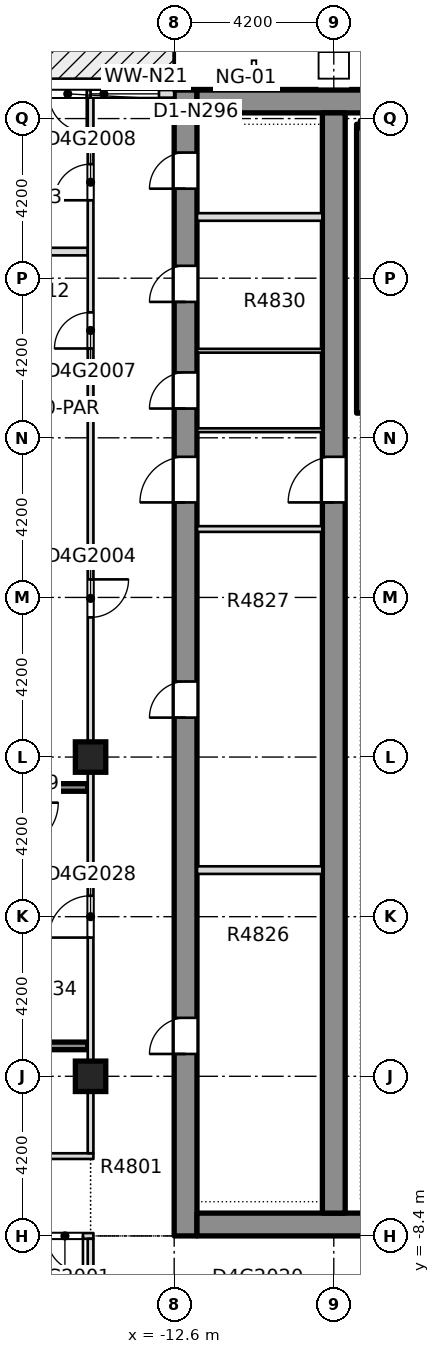
"""IFC4 building model, lengths in metres.
Left out: names, types, materials, properties, quantities, classifications, styles, units other than length and angle.
Written with IfcOpenShell. Run it as: python <this file> out.ifc"""

import sys

from ifc_helpers import new_model, si_unit, direction, frame, frame_2d, origin, origin_2d, place, context, subcontext, project, spatial, rectangle, extrude, element, fill, save


model = new_model("IFC4")
c1 = context("Model", 3, precision=1e-05, world=origin(), true_north=direction((0.0, 1.0)))
c2 = subcontext(c1, "Body", "Model", "MODEL_VIEW")
j1 = project(units=[si_unit("LENGTHUNIT", "METRE"), si_unit("PLANEANGLEUNIT", "RADIAN")], contexts=[c1])
p1 = place(None, origin())
s1 = spatial("IfcSite", under=j1, at=p1, CompositionType="ELEMENT")
p2 = place(p1, origin())
s2 = spatial("IfcBuilding", under=s1, at=p2, CompositionType="ELEMENT")
p3 = place(p2, frame((0.0, 0.0, 185.9)))
s3 = spatial("IfcBuildingStorey", under=s2, at=p3, CompositionType="ELEMENT", Elevation=185.9)
p4 = place(p3, frame((-12.3, -8.4, -0.4), z_axis=(0.0, 0.0, 1.0), x_axis=(0.0, 1.0, 0.0)))
e1 = element("IfcWall", 1, at=p4, inside=s3, PredefinedType="SHEAR", context=c2, shape_type="SweptSolid", body=[
    extrude(rectangle(XDim=30.15, YDim=0.6, at=frame_2d((15.075, 0.0))), origin(), (0.0, 0.0, 1.0), 3.45),
])
p5 = place(p4, frame((4.788, 0.0, 0.4)))
e2 = element("IfcOpeningElement", 2, at=p5, cuts=e1, PredefinedType="OPENING", context=c2, shape_type="SweptSolid", body=[
    extrude(rectangle(XDim=0.95, YDim=2.1, at=frame_2d((0.475, 1.05))), frame((0.0, 0.31, 0.0), z_axis=(0.0, -1.0, 0.0), x_axis=(1.0, 0.0, 0.0)), (0.0, 0.0, 1.0), 0.62),
])
p6 = place(p4, frame((13.638, 0.0, 0.4)))
e3 = element("IfcOpeningElement", 3, at=p6, cuts=e1, PredefinedType="OPENING", context=c2, shape_type="SweptSolid", body=[
    extrude(rectangle(XDim=0.95, YDim=2.1, at=frame_2d((0.475, 1.05))), frame((0.0, 0.31, 0.0), z_axis=(0.0, -1.0, 0.0), x_axis=(1.0, 0.0, 0.0)), (0.0, 0.0, 1.0), 0.62),
])
p7 = place(p4, frame((21.771, 0.0, 0.4)))
e4 = element("IfcOpeningElement", 4, at=p7, cuts=e1, PredefinedType="OPENING", context=c2, shape_type="SweptSolid", body=[
    extrude(rectangle(XDim=0.95, YDim=2.1, at=frame_2d((0.475, 1.05))), frame((0.0, 0.31, 0.0), z_axis=(0.0, -1.0, 0.0), x_axis=(1.0, 0.0, 0.0)), (0.0, 0.0, 1.0), 0.62),
])
p8 = place(p4, frame((24.576, 0.0, 0.4)))
e5 = element("IfcOpeningElement", 5, at=p8, cuts=e1, PredefinedType="OPENING", context=c2, shape_type="SweptSolid", body=[
    extrude(rectangle(XDim=0.95, YDim=2.1, at=frame_2d((0.475, 1.05))), frame((0.0, 0.31, 0.0), z_axis=(0.0, -1.0, 0.0), x_axis=(1.0, 0.0, 0.0)), (0.0, 0.0, 1.0), 0.62),
])
p9 = place(p4, frame((27.555, 0.0, 0.4)))
e6 = element("IfcOpeningElement", 6, at=p9, cuts=e1, PredefinedType="OPENING", context=c2, shape_type="SweptSolid", body=[
    extrude(rectangle(XDim=0.95, YDim=2.1, at=frame_2d((0.475, 1.05))), frame((0.0, 0.31, 0.0), z_axis=(0.0, -1.0, 0.0), x_axis=(1.0, 0.0, 0.0)), (0.0, 0.0, 1.0), 0.62),
])
p10 = place(p4, frame((19.3, 0.0, 0.4)))
e7 = element("IfcOpeningElement", 7, at=p10, cuts=e1, PredefinedType="OPENING", context=c2, shape_type="SweptSolid", body=[
    extrude(rectangle(XDim=1.2, YDim=2.1, at=frame_2d((0.6, 1.05))), frame((0.0, 0.31, 0.0), z_axis=(0.0, -1.0, 0.0), x_axis=(1.0, 0.0, 0.0)), (0.0, 0.0, 1.0), 0.62),
])
p11 = place(p3, frame((-12.0, -8.1, -0.4), z_axis=(0.0, 0.0, 1.0), x_axis=(1.0, 0.0, 0.0)))
e8 = element("IfcWall", 8, at=p11, inside=s3, PredefinedType="SHEAR", context=c2, shape_type="SweptSolid", body=[
    extrude(rectangle(XDim=24.0, YDim=0.6, at=frame_2d((12.0, 0.0))), origin(), (0.0, 0.0, 1.0), 3.45),
])
p12 = place(p11, frame((7.25, 0.0, 0.4)))
e9 = element("IfcOpeningElement", 9, at=p12, cuts=e8, PredefinedType="OPENING", context=c2, shape_type="SweptSolid", body=[
    extrude(rectangle(XDim=1.8, YDim=2.1, at=frame_2d((0.9, 1.05))), frame((0.0, 0.31, 0.0), z_axis=(0.0, -1.0, 0.0), x_axis=(1.0, 0.0, 0.0)), (0.0, 0.0, 1.0), 0.62),
])
p13 = place(p11, frame((14.95, 0.0, 0.4)))
e10 = element("IfcOpeningElement", 10, at=p13, cuts=e8, PredefinedType="OPENING", context=c2, shape_type="SweptSolid", body=[
    extrude(rectangle(XDim=1.8, YDim=2.1, at=frame_2d((0.9, 1.05))), frame((0.0, 0.31, 0.0), z_axis=(0.0, -1.0, 0.0), x_axis=(1.0, 0.0, 0.0)), (0.0, 0.0, 1.0), 0.62),
])
p14 = place(p3, frame((-12.0, 21.45, -0.4), z_axis=(0.0, 0.0, 1.0), x_axis=(1.0, 0.0, 0.0)))
e11 = element("IfcWall", 11, at=p14, inside=s3, PredefinedType="SHEAR", context=c2, shape_type="SweptSolid", body=[
    extrude(rectangle(XDim=24.0, YDim=0.6, at=frame_2d((12.0, 0.0))), origin(), (0.0, 0.0, 1.0), 3.45),
])
p15 = place(p3, frame((-8.4, -7.8, -0.4), z_axis=(0.0, 0.0, 1.0), x_axis=(0.0, 1.0, 0.0)))
e12 = element("IfcWall", 12, at=p15, inside=s3, PredefinedType="SHEAR", context=c2, shape_type="SweptSolid", body=[
    extrude(rectangle(XDim=28.95, YDim=0.6, at=frame_2d((14.475, 0.0))), origin(), (0.0, 0.0, 1.0), 3.45),
])
p16 = place(p15, frame((18.7, 0.0, 0.4)))
e13 = element("IfcOpeningElement", 13, at=p16, cuts=e12, PredefinedType="OPENING", context=c2, shape_type="SweptSolid", body=[
    extrude(rectangle(XDim=1.2, YDim=2.1, at=frame_2d((0.6, 1.05))), frame((0.0, 0.31, 0.0), z_axis=(0.0, -1.0, 0.0), x_axis=(1.0, 0.0, 0.0)), (0.0, 0.0, 1.0), 0.62),
])
for number, where, z_axis, x_axis in (
    (14, (-14.8, -4.2, -0.4), (0.0, 0.0, 1.0), (1.0, 0.0, 0.0)),
    (15, (-14.8, 4.2, -0.4), (0.0, 0.0, 1.0), (1.0, 0.0, 0.0)),
):
    element("IfcColumn", number, at=place(p3, frame(where, z_axis=z_axis, x_axis=x_axis)), inside=s3, PredefinedType="COLUMN", context=c2, shape_type="SweptSolid", body=[
        extrude(rectangle(XDim=0.8, YDim=0.8, at=origin_2d()), origin(), (0.0, 0.0, 1.0), 3.45),
    ])
p17 = place(p3, frame((-25.75, -8.4, 0.0), z_axis=(0.0, 0.0, 1.0), x_axis=(1.0, 0.0, 0.0)))
e16 = element("IfcWall", 16, at=p17, inside=s3, PredefinedType="PARTITIONING", context=c2, shape_type="SweptSolid", body=[
    extrude(rectangle(XDim=11.025, YDim=0.15, at=frame_2d((5.512, 0.0))), origin(), (0.0, 0.0, 1.0), 3.05),
])
p18 = place(p17, frame((9.8, 0.0, 0.0)))
e17 = element("IfcOpeningElement", 17, at=p18, cuts=e16, PredefinedType="OPENING", context=c2, shape_type="SweptSolid", body=[
    extrude(rectangle(XDim=0.95, YDim=2.1, at=frame_2d((0.475, 1.05))), frame((0.0, 0.085, 0.0), z_axis=(0.0, -1.0, 0.0), x_axis=(1.0, 0.0, 0.0)), (0.0, 0.0, 1.0), 0.17),
])
p19 = place(p3, frame((-25.75, -6.3, 0.0), z_axis=(0.0, 0.0, 1.0), x_axis=(1.0, 0.0, 0.0)))
e18 = element("IfcWall", 18, at=p19, inside=s3, PredefinedType="PARTITIONING", context=c2, shape_type="SweptSolid", body=[
    extrude(rectangle(XDim=11.025, YDim=0.15, at=frame_2d((5.512, 0.0))), origin(), (0.0, 0.0, 1.0), 3.05),
])
p20 = place(p19, frame((4.875, 0.0, 0.0)))
e19 = element("IfcOpeningElement", 19, at=p20, cuts=e18, PredefinedType="OPENING", context=c2, shape_type="SweptSolid", body=[
    extrude(rectangle(XDim=1.0, YDim=2.1, at=frame_2d((0.5, 1.05))), frame((0.0, 0.085, 0.0), z_axis=(0.0, -1.0, 0.0), x_axis=(1.0, 0.0, 0.0)), (0.0, 0.0, 1.0), 0.17),
])
p21 = place(p3, frame((-23.0, -3.4, 0.0), z_axis=(0.0, 0.0, 1.0), x_axis=(1.0, 0.0, 0.0)))
e20 = element("IfcWall", 20, at=p21, inside=s3, PredefinedType="SOLIDWALL", context=c2, shape_type="SweptSolid", body=[
    extrude(rectangle(XDim=8.125, YDim=0.2, at=frame_2d((4.062, 0.0))), origin(), (0.0, 0.0, 1.0), 3.05),
])
p22 = place(p3, frame((-20.45, 3.4, 0.0), z_axis=(0.0, 0.0, 1.0), x_axis=(1.0, 0.0, 0.0)))
e21 = element("IfcWall", 21, at=p22, inside=s3, PredefinedType="SOLIDWALL", context=c2, shape_type="SweptSolid", body=[
    extrude(rectangle(XDim=5.575, YDim=0.2, at=frame_2d((2.788, 0.0))), origin(), (0.0, 0.0, 1.0), 3.05),
])
for number, where, z_axis, x_axis in (
    (22, (-17.35, 13.35, 0.0), (0.0, 0.0, 1.0), (1.0, 0.0, 0.0)),
    (23, (-17.35, 17.5, 0.0), (0.0, 0.0, 1.0), (1.0, 0.0, 0.0)),
):
    element("IfcWall", number, at=place(p3, frame(where, z_axis=z_axis, x_axis=x_axis)), inside=s3, PredefinedType="PARTITIONING", context=c2, shape_type="SweptSolid", body=[
        extrude(rectangle(XDim=2.475, YDim=0.2, at=frame_2d((1.238, 0.0))), origin(), (0.0, 0.0, 1.0), 3.05),
    ])
p23 = place(p3, frame((-14.8, -10.6, 0.0), z_axis=(0.0, 0.0, 1.0), x_axis=(0.0, 1.0, 0.0)))
e24 = element("IfcWall", 24, at=p23, inside=s3, PredefinedType="PARTITIONING", context=c2, shape_type="SweptSolid", body=[
    extrude(rectangle(XDim=2.125, YDim=0.15, at=frame_2d((1.062, 0.0))), origin(), (0.0, 0.0, 1.0), 3.05),
])
p24 = place(p3, frame((-14.8, -6.225, 0.0), z_axis=(0.0, 0.0, 1.0), x_axis=(0.0, 1.0, 0.0)))
e25 = element("IfcWall", 25, at=p24, inside=s3, PredefinedType="PARTITIONING", context=c2, shape_type="SweptSolid", body=[
    extrude(rectangle(XDim=27.775, YDim=0.15, at=frame_2d((13.888, 0.0))), origin(), (0.0, 0.0, 1.0), 3.05),
])
p25 = place(p24, frame((14.1, 0.0, 0.0)))
e26 = element("IfcOpeningElement", 26, at=p25, cuts=e25, PredefinedType="OPENING", context=c2, shape_type="SweptSolid", body=[
    extrude(rectangle(XDim=1.0, YDim=2.1, at=frame_2d((0.5, 1.05))), frame((0.0, 0.085, 0.0), z_axis=(0.0, -1.0, 0.0), x_axis=(1.0, 0.0, 0.0)), (0.0, 0.0, 1.0), 0.17),
])
p26 = place(p24, frame((21.175, 0.0, 0.0)))
e27 = element("IfcOpeningElement", 27, at=p26, cuts=e25, PredefinedType="OPENING", context=c2, shape_type="SweptSolid", body=[
    extrude(rectangle(XDim=0.95, YDim=2.1, at=frame_2d((0.475, 1.05))), frame((0.0, 0.085, 0.0), z_axis=(0.0, -1.0, 0.0), x_axis=(1.0, 0.0, 0.0)), (0.0, 0.0, 1.0), 0.17),
])
p27 = place(p24, frame((25.075, 0.0, 0.0)))
e28 = element("IfcOpeningElement", 28, at=p27, cuts=e25, PredefinedType="OPENING", context=c2, shape_type="SweptSolid", body=[
    extrude(rectangle(XDim=0.95, YDim=2.1, at=frame_2d((0.475, 1.05))), frame((0.0, 0.085, 0.0), z_axis=(0.0, -1.0, 0.0), x_axis=(1.0, 0.0, 0.0)), (0.0, 0.0, 1.0), 0.17),
])
p28 = place(p24, frame((5.675, 0.0, 0.0)))
e29 = element("IfcOpeningElement", 29, at=p28, cuts=e25, PredefinedType="OPENING", context=c2, shape_type="SweptSolid", body=[
    extrude(rectangle(XDim=1.1, YDim=2.1, at=frame_2d((0.55, 1.05))), frame((0.0, 0.085, 0.0), z_axis=(0.0, -1.0, 0.0), x_axis=(1.0, 0.0, 0.0)), (0.0, 0.0, 1.0), 0.17),
])
p29 = place(p3, frame((-12.6, 21.65, 0.0), z_axis=(0.0, 0.0, 1.0), x_axis=(-1.0, 0.0, 0.0)))
e30 = element("IfcWall", 30, at=p29, inside=s3, PredefinedType="STANDARD", context=c2, shape_type="SweptSolid", body=[
    extrude(rectangle(XDim=3.7, YDim=0.2, at=frame_2d((1.85, 0.0))), origin(), (0.0, 0.0, 1.0), 3.05),
])
p30 = place(p29, frame((0.4, 0.0, 0.2)))
e31 = element("IfcOpeningElement", 31, at=p30, cuts=e30, PredefinedType="OPENING", context=c2, shape_type="SweptSolid", body=[
    extrude(rectangle(XDim=1.8, YDim=2.65, at=frame_2d((0.9, 1.325))), frame((0.0, 0.11, 0.0), z_axis=(0.0, -1.0, 0.0), x_axis=(1.0, 0.0, 0.0)), (0.0, 0.0, 1.0), 0.22),
])
p31 = place(p29, frame((2.3, 0.0, 0.0)))
e32 = element("IfcOpeningElement", 32, at=p31, cuts=e30, PredefinedType="OPENING", context=c2, shape_type="SweptSolid", body=[
    extrude(rectangle(XDim=1.0, YDim=2.4, at=frame_2d((0.5, 1.2))), frame((0.0, 0.11, 0.0), z_axis=(0.0, -1.0, 0.0), x_axis=(1.0, 0.0, 0.0)), (0.0, 0.0, 1.0), 0.22),
])
p32 = place(p3, frame((-11.999, 1.225, 0.0), z_axis=(0.0, 0.0, 1.0), x_axis=(1.0, 0.0, 0.0)))
e33 = element("IfcWall", 33, at=p32, inside=s3, PredefinedType="PARTITIONING", context=c2, shape_type="SweptSolid", body=[
    extrude(rectangle(XDim=3.298, YDim=0.2, at=frame_2d((1.649, 0.0))), origin(), (0.0, 0.0, 1.0), 3.05),
])
p33 = place(p3, frame((-11.999, 10.2, 0.0), z_axis=(0.0, 0.0, 1.0), x_axis=(1.0, 0.0, 0.0)))
e34 = element("IfcWall", 34, at=p33, inside=s3, PredefinedType="PARTITIONING", context=c2, shape_type="SweptSolid", body=[
    extrude(rectangle(XDim=3.298, YDim=0.15, at=frame_2d((1.649, 0.0))), origin(), (0.0, 0.0, 1.0), 3.05),
])
for number, where, z_axis, x_axis in (
    (35, (-11.999, 12.8, 0.0), (0.0, 0.0, 1.0), (1.0, 0.0, 0.0)),
    (36, (-11.999, 14.891, 0.0), (0.0, 0.0, 1.0), (1.0, 0.0, 0.0)),
):
    element("IfcWall", number, at=place(p3, frame(where, z_axis=z_axis, x_axis=x_axis)), inside=s3, PredefinedType="PARTITIONING", context=c2, shape_type="SweptSolid", body=[
        extrude(rectangle(XDim=3.298, YDim=0.1, at=frame_2d((1.649, 0.0))), origin(), (0.0, 0.0, 1.0), 3.05),
    ])
p34 = place(p3, frame((-11.999, 18.411, 0.0), z_axis=(0.0, 0.0, 1.0), x_axis=(1.0, 0.0, 0.0)))
e37 = element("IfcWall", 37, at=p34, inside=s3, PredefinedType="PARTITIONING", context=c2, shape_type="SweptSolid", body=[
    extrude(rectangle(XDim=3.298, YDim=0.2, at=frame_2d((1.649, 0.0))), origin(), (0.0, 0.0, 1.0), 3.05),
])
p35 = place(p3, frame((-7.7, 13.25, 0.0), z_axis=(0.0, 0.0, 1.0), x_axis=(0.0, 1.0, 0.0)))
e38 = element("IfcWall", 38, at=p35, inside=s3, PredefinedType="SOLIDWALL", context=c2, shape_type="SweptSolid", body=[
    extrude(rectangle(XDim=7.6, YDim=0.2, at=frame_2d((3.8, 0.0))), origin(), (0.0, 0.0, 1.0), 3.05),
])
p36 = place(p3, frame((-7.7, 20.85, 0.0), z_axis=(0.0, 0.0, 1.0), x_axis=(1.0, 0.0, 0.0)))
e39 = element("IfcWall", 39, at=p36, inside=s3, PredefinedType="SOLIDWALL", context=c2, shape_type="SweptSolid", body=[
    extrude(rectangle(XDim=3.55, YDim=0.2, at=frame_2d((1.775, 0.0))), origin(), (0.0, 0.0, 1.0), 3.05),
])
p37 = place(p18, origin())
e40 = element("IfcDoor", 40, at=p37, inside=s3, OperationType="SINGLE_SWING_RIGHT", PredefinedType="DOOR", context=c2, shape_type="SweptSolid", body=[
    extrude(rectangle(XDim=0.95, YDim=2.1, at=frame_2d((0.475, 1.05))), frame((0.0, 0.025, 0.0), z_axis=(0.0, -1.0, 0.0), x_axis=(1.0, 0.0, 0.0)), (0.0, 0.0, 1.0), 0.05),
])
fill(e17, e40)
p38 = place(p25, origin())
e41 = element("IfcDoor", 41, at=p38, inside=s3, OperationType="SINGLE_SWING_LEFT", PredefinedType="DOOR", context=c2, shape_type="SweptSolid", body=[
    extrude(rectangle(XDim=1.0, YDim=2.1, at=frame_2d((0.5, 1.05))), frame((0.0, 0.025, 0.0), z_axis=(0.0, -1.0, 0.0), x_axis=(1.0, 0.0, 0.0)), (0.0, 0.0, 1.0), 0.05),
])
fill(e26, e41)
p39 = place(p26, origin())
e42 = element("IfcDoor", 42, at=p39, inside=s3, OperationType="SINGLE_SWING_RIGHT", PredefinedType="DOOR", context=c2, shape_type="SweptSolid", body=[
    extrude(rectangle(XDim=0.95, YDim=2.1, at=frame_2d((0.475, 1.05))), frame((0.0, 0.025, 0.0), z_axis=(0.0, -1.0, 0.0), x_axis=(1.0, 0.0, 0.0)), (0.0, 0.0, 1.0), 0.05),
])
fill(e27, e42)
p40 = place(p27, origin())
e43 = element("IfcDoor", 43, at=p40, inside=s3, OperationType="SINGLE_SWING_LEFT", PredefinedType="DOOR", context=c2, shape_type="SweptSolid", body=[
    extrude(rectangle(XDim=0.95, YDim=2.1, at=frame_2d((0.475, 1.05))), frame((0.0, 0.025, 0.0), z_axis=(0.0, -1.0, 0.0), x_axis=(1.0, 0.0, 0.0)), (0.0, 0.0, 1.0), 0.05),
])
fill(e28, e43)
p41 = place(p28, origin())
e44 = element("IfcDoor", 44, at=p41, inside=s3, OperationType="SINGLE_SWING_RIGHT", PredefinedType="DOOR", context=c2, shape_type="SweptSolid", body=[
    extrude(rectangle(XDim=1.1, YDim=2.1, at=frame_2d((0.55, 1.05))), frame((0.0, 0.025, 0.0), z_axis=(0.0, -1.0, 0.0), x_axis=(1.0, 0.0, 0.0)), (0.0, 0.0, 1.0), 0.05),
])
fill(e29, e44)
p42 = place(p30, origin())
e45 = element("IfcWindow", 45, at=p42, inside=s3, PartitioningType="SINGLE_PANEL", PredefinedType="WINDOW", context=c2, shape_type="SweptSolid", body=[
    extrude(rectangle(XDim=1.8, YDim=2.65, at=frame_2d((0.9, 1.325))), frame((0.0, 0.03, 0.0), z_axis=(0.0, -1.0, 0.0), x_axis=(1.0, 0.0, 0.0)), (0.0, 0.0, 1.0), 0.06),
])
fill(e31, e45)
p43 = place(p31, origin())
e46 = element("IfcDoor", 46, at=p43, inside=s3, OperationType="SINGLE_SWING_LEFT", PredefinedType="DOOR", context=c2, shape_type="SweptSolid", body=[
    extrude(rectangle(XDim=1.0, YDim=2.4, at=frame_2d((0.5, 1.2))), frame((0.0, 0.025, 0.0), z_axis=(0.0, -1.0, 0.0), x_axis=(1.0, 0.0, 0.0)), (0.0, 0.0, 1.0), 0.05),
])
fill(e32, e46)
p44 = place(p5, origin())
e47 = element("IfcDoor", 47, at=p44, inside=s3, OperationType="SINGLE_SWING_LEFT", PredefinedType="DOOR", context=c2, shape_type="SweptSolid", body=[
    extrude(rectangle(XDim=0.95, YDim=2.1, at=frame_2d((0.475, 1.05))), frame((0.0, 0.025, 0.0), z_axis=(0.0, -1.0, 0.0), x_axis=(1.0, 0.0, 0.0)), (0.0, 0.0, 1.0), 0.05),
])
fill(e2, e47)
p45 = place(p6, origin())
e48 = element("IfcDoor", 48, at=p45, inside=s3, OperationType="SINGLE_SWING_LEFT", PredefinedType="DOOR", context=c2, shape_type="SweptSolid", body=[
    extrude(rectangle(XDim=0.95, YDim=2.1, at=frame_2d((0.475, 1.05))), frame((0.0, 0.025, 0.0), z_axis=(0.0, -1.0, 0.0), x_axis=(1.0, 0.0, 0.0)), (0.0, 0.0, 1.0), 0.05),
])
fill(e3, e48)
p46 = place(p7, origin())
e49 = element("IfcDoor", 49, at=p46, inside=s3, OperationType="SINGLE_SWING_LEFT", PredefinedType="DOOR", context=c2, shape_type="SweptSolid", body=[
    extrude(rectangle(XDim=0.95, YDim=2.1, at=frame_2d((0.475, 1.05))), frame((0.0, 0.025, 0.0), z_axis=(0.0, -1.0, 0.0), x_axis=(1.0, 0.0, 0.0)), (0.0, 0.0, 1.0), 0.05),
])
fill(e4, e49)
p47 = place(p8, origin())
e50 = element("IfcDoor", 50, at=p47, inside=s3, OperationType="SINGLE_SWING_LEFT", PredefinedType="DOOR", context=c2, shape_type="SweptSolid", body=[
    extrude(rectangle(XDim=0.95, YDim=2.1, at=frame_2d((0.475, 1.05))), frame((0.0, 0.025, 0.0), z_axis=(0.0, -1.0, 0.0), x_axis=(1.0, 0.0, 0.0)), (0.0, 0.0, 1.0), 0.05),
])
fill(e5, e50)
p48 = place(p9, origin())
e51 = element("IfcDoor", 51, at=p48, inside=s3, OperationType="SINGLE_SWING_LEFT", PredefinedType="DOOR", context=c2, shape_type="SweptSolid", body=[
    extrude(rectangle(XDim=0.95, YDim=2.1, at=frame_2d((0.475, 1.05))), frame((0.0, 0.025, 0.0), z_axis=(0.0, -1.0, 0.0), x_axis=(1.0, 0.0, 0.0)), (0.0, 0.0, 1.0), 0.05),
])
fill(e6, e51)
p49 = place(p10, origin())
e52 = element("IfcDoor", 52, at=p49, inside=s3, OperationType="SINGLE_SWING_LEFT", PredefinedType="DOOR", context=c2, shape_type="SweptSolid", body=[
    extrude(rectangle(XDim=1.2, YDim=2.1, at=frame_2d((0.6, 1.05))), frame((0.0, 0.025, 0.0), z_axis=(0.0, -1.0, 0.0), x_axis=(1.0, 0.0, 0.0)), (0.0, 0.0, 1.0), 0.05),
])
fill(e7, e52)
p50 = place(p16, origin())
e53 = element("IfcDoor", 53, at=p50, inside=s3, OperationType="SINGLE_SWING_LEFT", PredefinedType="DOOR", context=c2, shape_type="SweptSolid", body=[
    extrude(rectangle(XDim=1.2, YDim=2.1, at=frame_2d((0.6, 1.05))), frame((0.0, 0.025, 0.0), z_axis=(0.0, -1.0, 0.0), x_axis=(1.0, 0.0, 0.0)), (0.0, 0.0, 1.0), 0.05),
])
fill(e13, e53)
save(model, sys.argv[1])
